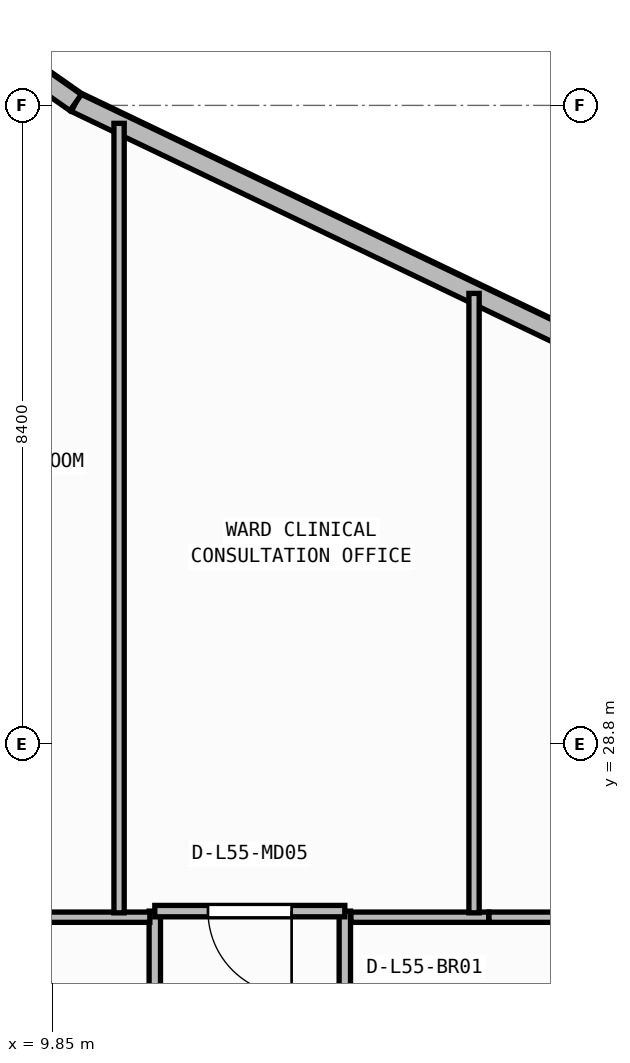
"""IFC4 building model, lengths in metres.
Left out: names, types, materials, properties, quantities, classifications, styles, units other than length and angle.
Written with IfcOpenShell. Run it as: python <this file> out.ifc"""

import sys

from ifc_helpers import new_model, si_unit, direction, frame, frame_2d, origin, place, context, subcontext, project, spatial, rectangle, extrude, element, fill, save


model = new_model("IFC4")
c1 = context("Model", 3, precision=1e-05, world=origin(), true_north=direction((0.0, 1.0)))
c2 = subcontext(c1, "Body", "Model", "MODEL_VIEW")
j1 = project(units=[si_unit("LENGTHUNIT", "METRE"), si_unit("PLANEANGLEUNIT", "RADIAN")], contexts=[c1])
p1 = place(None, origin())
s1 = spatial("IfcSite", under=j1, at=p1, CompositionType="ELEMENT")
p2 = place(p1, origin())
s2 = spatial("IfcBuilding", under=s1, at=p2, CompositionType="ELEMENT")
p3 = place(p2, frame((0.0, 0.0, 223.7)))
s3 = spatial("IfcBuildingStorey", under=s2, at=p3, CompositionType="ELEMENT", Elevation=223.7)
p4 = place(p3, frame((21.461, 31.823, 0.0), z_axis=(0.0, 0.0, 1.0), x_axis=(-0.901858094827, 0.432032379336, 0.0)))
e1 = element("IfcWall", 1, at=p4, inside=s3, PredefinedType="STANDARD", context=c2, shape_type="SweptSolid", body=[
    extrude(rectangle(XDim=12.532, YDim=0.26, at=frame_2d((6.266, 0.0))), origin(), (0.0, 0.0, 1.0), 3.71),
])
p5 = place(p4, frame((2.71, 0.0, 0.9)))
e2 = element("IfcOpeningElement", 2, at=p5, cuts=e1, PredefinedType="OPENING", context=c2, shape_type="SweptSolid", body=[
    extrude(rectangle(XDim=2.4, YDim=1.65, at=frame_2d((1.2, 0.825))), frame((0.0, 0.14, 0.0), z_axis=(0.0, -1.0, 0.0), x_axis=(1.0, 0.0, 0.0)), (0.0, 0.0, 1.0), 0.28),
])
p6 = place(p3, frame((10.159, 37.237, 0.0), z_axis=(0.0, 0.0, 1.0), x_axis=(-0.818933702389, 0.57388813465, 0.0)))
e3 = element("IfcWall", 3, at=p6, inside=s3, PredefinedType="STANDARD", context=c2, shape_type="SweptSolid", body=[
    extrude(rectangle(XDim=9.157, YDim=0.26, at=frame_2d((4.579, 0.0))), origin(), (0.0, 0.0, 1.0), 3.71),
])
p7 = place(p6, frame((1.787, 0.0, 0.9)))
e4 = element("IfcOpeningElement", 4, at=p7, cuts=e3, PredefinedType="OPENING", context=c2, shape_type="SweptSolid", body=[
    extrude(rectangle(XDim=2.4, YDim=1.65, at=frame_2d((1.2, 0.825))), frame((0.0, 0.14, 0.0), z_axis=(0.0, -1.0, 0.0), x_axis=(1.0, 0.0, 0.0)), (0.0, 0.0, 1.0), 0.28),
])
p8 = place(p3, frame((11.2, 26.6, 0.0), z_axis=(0.0, 0.0, 1.0), x_axis=(0.0, -1.0, 0.0)))
e5 = element("IfcWall", 5, at=p8, inside=s3, PredefinedType="PARTITIONING", context=c2, shape_type="SweptSolid", body=[
    extrude(rectangle(XDim=11.9, YDim=0.15, at=frame_2d((5.95, 0.0))), origin(), (0.0, 0.0, 1.0), 3.71),
])
p9 = place(p3, frame((13.7, 22.994, 0.0), z_axis=(0.0, 0.0, 1.0), x_axis=(0.0, 1.0, 0.0)))
e6 = element("IfcWall", 6, at=p9, inside=s3, PredefinedType="PARTITIONING", context=c2, shape_type="SweptSolid", body=[
    extrude(rectangle(XDim=3.606, YDim=0.15, at=frame_2d((1.803, 0.0))), origin(), (0.0, 0.0, 1.0), 3.71),
])
p10 = place(p9, frame((1.253, 0.0, 0.0)))
e7 = element("IfcOpeningElement", 7, at=p10, cuts=e6, PredefinedType="OPENING", context=c2, shape_type="SweptSolid", body=[
    extrude(rectangle(XDim=1.1, YDim=2.1, at=frame_2d((0.55, 1.05))), frame((0.0, 0.085, 0.0), z_axis=(0.0, -1.0, 0.0), x_axis=(1.0, 0.0, 0.0)), (0.0, 0.0, 1.0), 0.17),
])
p11 = place(p3, frame((13.7, 26.6, 0.0), z_axis=(0.0, 0.0, 1.0), x_axis=(-1.0, 0.0, 0.0)))
e8 = element("IfcWall", 8, at=p11, inside=s3, PredefinedType="PARTITIONING", context=c2, shape_type="SweptSolid", body=[
    extrude(rectangle(XDim=2.5, YDim=0.15, at=frame_2d((1.25, 0.0))), origin(), (0.0, 0.0, 1.0), 3.71),
])
p12 = place(p11, frame((0.7, 0.0, 0.0)))
e9 = element("IfcOpeningElement", 9, at=p12, cuts=e8, PredefinedType="OPENING", context=c2, shape_type="SweptSolid", body=[
    extrude(rectangle(XDim=1.1, YDim=2.1, at=frame_2d((0.55, 1.05))), frame((0.0, 0.085, 0.0), z_axis=(0.0, -1.0, 0.0), x_axis=(1.0, 0.0, 0.0)), (0.0, 0.0, 1.0), 0.17),
])
p13 = place(p3, frame((11.135, 26.52, 0.0), z_axis=(0.0, 0.0, 1.0), x_axis=(-1.0, 0.0, 0.0)))
e10 = element("IfcWall", 10, at=p13, inside=s3, PredefinedType="PARTITIONING", context=c2, shape_type="SweptSolid", body=[
    extrude(rectangle(XDim=3.498, YDim=0.135, at=frame_2d((1.749, 0.0))), origin(), (0.0, 0.0, 1.0), 3.71),
])
p14 = place(p3, frame((15.594, 26.52, 0.0), z_axis=(0.0, 0.0, 1.0), x_axis=(-1.0, 0.0, 0.0)))
e11 = element("IfcWall", 11, at=p14, inside=s3, PredefinedType="PARTITIONING", context=c2, shape_type="SweptSolid", body=[
    extrude(rectangle(XDim=1.814, YDim=0.135, at=frame_2d((0.907, 0.0))), origin(), (0.0, 0.0, 1.0), 3.71),
])
p15 = place(p3, frame((18.32, 26.52, 0.0), z_axis=(0.0, 0.0, 1.0), x_axis=(-1.0, 0.0, 0.0)))
e12 = element("IfcWall", 12, at=p15, inside=s3, PredefinedType="PARTITIONING", context=c2, shape_type="SweptSolid", body=[
    extrude(rectangle(XDim=2.723, YDim=0.135, at=frame_2d((1.362, 0.0))), origin(), (0.0, 0.0, 1.0), 3.71),
])
p16 = place(p15, frame((0.231, 0.0, 0.0)))
e13 = element("IfcOpeningElement", 13, at=p16, cuts=e12, PredefinedType="OPENING", context=c2, shape_type="SweptSolid", body=[
    extrude(rectangle(XDim=1.1, YDim=2.1, at=frame_2d((0.55, 1.05))), frame((0.0, 0.077, 0.0), z_axis=(0.0, -1.0, 0.0), x_axis=(1.0, 0.0, 0.0)), (0.0, 0.0, 1.0), 0.155),
])
p17 = place(p3, frame((10.73, 26.577, 0.0), z_axis=(0.0, 0.0, 1.0), x_axis=(0.0, 1.0, 0.0)))
e14 = element("IfcWall", 14, at=p17, inside=s3, PredefinedType="PARTITIONING", context=c2, shape_type="SweptSolid", body=[
    extrude(rectangle(XDim=10.386, YDim=0.135, at=frame_2d((5.193, 0.0))), origin(), (0.0, 0.0, 1.0), 3.71),
])
p18 = place(p3, frame((15.4, 26.577, 0.0), z_axis=(0.0, 0.0, 1.0), x_axis=(0.0, 1.0, 0.0)))
e15 = element("IfcWall", 15, at=p18, inside=s3, PredefinedType="PARTITIONING", context=c2, shape_type="SweptSolid", body=[
    extrude(rectangle(XDim=8.149, YDim=0.135, at=frame_2d((4.075, 0.0))), origin(), (0.0, 0.0, 1.0), 3.71),
])
p19 = place(p12, origin())
e16 = element("IfcDoor", 16, at=p19, inside=s3, OperationType="SINGLE_SWING_LEFT", PredefinedType="DOOR", context=c2, shape_type="SweptSolid", body=[
    extrude(rectangle(XDim=1.1, YDim=2.1, at=frame_2d((0.55, 1.05))), frame((0.0, 0.025, 0.0), z_axis=(0.0, -1.0, 0.0), x_axis=(1.0, 0.0, 0.0)), (0.0, 0.0, 1.0), 0.05),
])
fill(e9, e16)
save(model, sys.argv[1])
